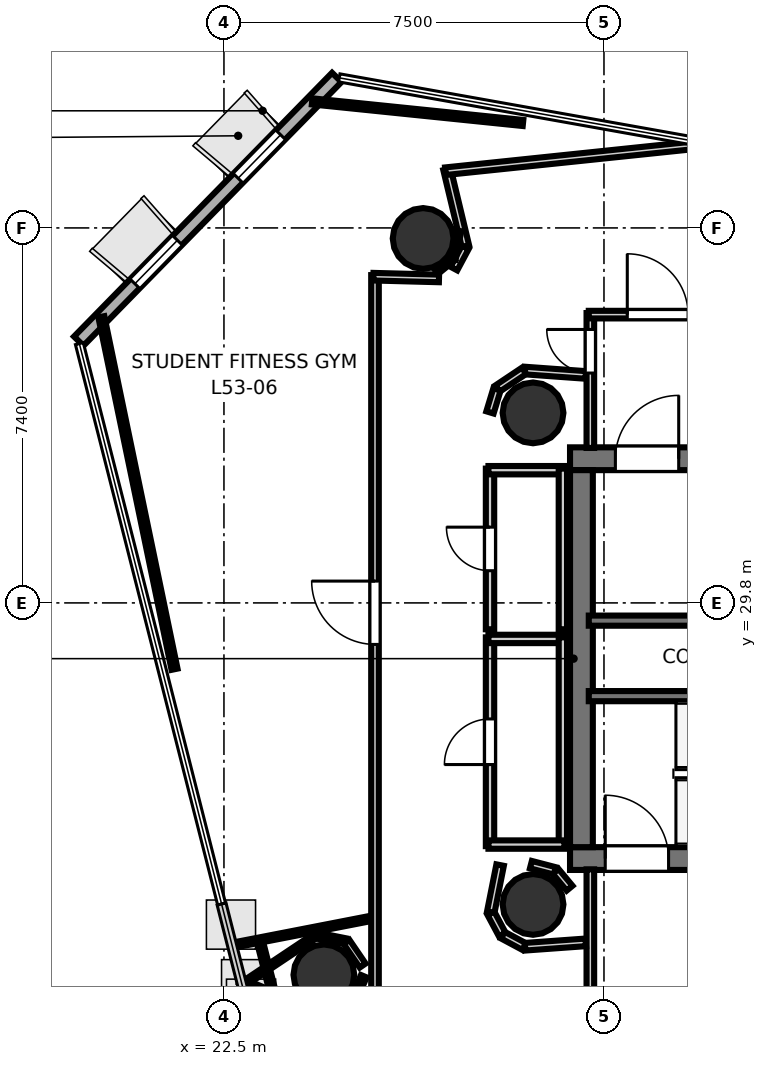
"""IFC4 building model, lengths in metres.
Left out: names, types, materials, properties, quantities, classifications, styles, units other than length and angle.
Written with IfcOpenShell. Run it as: python <this file> out.ifc"""

import sys

from ifc_helpers import new_model, si_unit, direction, frame, frame_2d, origin, origin_2d, place, context, subcontext, project, spatial, rectangle, hollow_circle, extrude, element, fill, save


model = new_model("IFC4")
c1 = context("Model", 3, precision=1e-05, world=origin(), true_north=direction((0.0, 1.0)))
c2 = subcontext(c1, "Body", "Model", "MODEL_VIEW")
j1 = project(units=[si_unit("LENGTHUNIT", "METRE"), si_unit("PLANEANGLEUNIT", "RADIAN")], contexts=[c1])
p1 = place(None, origin())
s1 = spatial("IfcSite", under=j1, at=p1, CompositionType="ELEMENT")
p2 = place(p1, origin())
s2 = spatial("IfcBuilding", under=s1, at=p2, CompositionType="ELEMENT")
p3 = place(p2, frame((0.0, 0.0, 207.7)))
s3 = spatial("IfcBuildingStorey", under=s2, at=p3, CompositionType="ELEMENT", Elevation=207.7)
p4 = place(p3, frame((29.33, 32.645, 0.0), z_axis=(0.0, 0.0, 1.0), x_axis=(1.0, 0.0, 0.0)))
e1 = element("IfcWall", 1, at=p4, inside=s3, PredefinedType="SHEAR", context=c2, shape_type="SweptSolid", body=[
    extrude(rectangle(XDim=10.52, YDim=0.45, at=frame_2d((5.26, 0.0))), origin(), (0.0, 0.0, 1.0), 3.52),
])
p5 = place(p4, frame((0.895, 0.0, 0.0)))
e2 = element("IfcOpeningElement", 2, at=p5, cuts=e1, PredefinedType="OPENING", context=c2, shape_type="SweptSolid", body=[
    extrude(rectangle(XDim=1.25, YDim=2.15, at=frame_2d((0.625, 1.075))), frame((0.0, 0.235, 0.0), z_axis=(0.0, -1.0, 0.0), x_axis=(1.0, 0.0, 0.0)), (0.0, 0.0, 1.0), 0.47),
])
p6 = place(p3, frame((29.33, 24.755, 0.0), z_axis=(0.0, 0.0, 1.0), x_axis=(1.0, 0.0, 0.0)))
e3 = element("IfcWall", 3, at=p6, inside=s3, PredefinedType="SHEAR", context=c2, shape_type="SweptSolid", body=[
    extrude(rectangle(XDim=10.52, YDim=0.45, at=frame_2d((5.26, 0.0))), origin(), (0.0, 0.0, 1.0), 3.52),
])
p7 = place(p6, frame((0.695, 0.0, 0.0)))
e4 = element("IfcOpeningElement", 4, at=p7, cuts=e3, PredefinedType="OPENING", context=c2, shape_type="SweptSolid", body=[
    extrude(rectangle(XDim=1.25, YDim=2.15, at=frame_2d((0.625, 1.075))), frame((0.0, 0.235, 0.0), z_axis=(0.0, -1.0, 0.0), x_axis=(1.0, 0.0, 0.0)), (0.0, 0.0, 1.0), 0.47),
])
p8 = place(p3, frame((29.555, 24.98, 0.0), z_axis=(0.0, 0.0, 1.0), x_axis=(0.0, 1.0, 0.0)))
e5 = element("IfcWall", 5, at=p8, inside=s3, PredefinedType="SHEAR", context=c2, shape_type="SweptSolid", body=[
    extrude(rectangle(XDim=7.44, YDim=0.45, at=frame_2d((3.72, 0.0))), origin(), (0.0, 0.0, 1.0), 3.52),
])
for number, where, z_axis, x_axis in (
    (6, (28.6, 33.55, 0.0), (0.0, 0.0, 1.0), (1.0, 0.0, 0.0)),
    (7, (28.6, 23.85, 0.0), (0.0, 0.0, 1.0), (1.0, 0.0, 0.0)),
    (8, (26.431, 36.992, 0.0), (0.0, 0.0, 1.0), (1.0, 0.0, 0.0)),
    (9, (24.472, 22.46, 0.0), (0.0, 0.0, 1.0), (1.0, 0.0, 0.0)),
):
    element("IfcColumn", number, at=place(p3, frame(where, z_axis=z_axis, x_axis=x_axis)), inside=s3, PredefinedType="COLUMN", context=c2, shape_type="SweptSolid", body=[
        extrude(hollow_circle(Radius=0.6, WallThickness=0.03, at=origin_2d()), origin(), (0.0, 0.0, 1.0), 3.7),
    ])
p9 = place(p3, frame((24.727, 40.17, 0.0), z_axis=(0.0, 0.0, 1.0), x_axis=(-0.699336240907, -0.714792852618, 0.0)))
e10 = element("IfcWall", 10, at=p9, inside=s3, PredefinedType="SOLIDWALL", context=c2, shape_type="SweptSolid", body=[
    extrude(rectangle(XDim=7.281, YDim=0.26, at=frame_2d((3.641, 0.0))), origin(), (0.0, 0.0, 1.0), 3.52),
])
p10 = place(p9, frame((1.584, 0.0, 0.9)))
e11 = element("IfcOpeningElement", 11, at=p10, cuts=e10, PredefinedType="OPENING", context=c2, shape_type="SweptSolid", body=[
    extrude(rectangle(XDim=1.2, YDim=2.0, at=frame_2d((0.6, 1.0))), frame((0.0, 0.14, 0.0), z_axis=(0.0, -1.0, 0.0), x_axis=(1.0, 0.0, 0.0)), (0.0, 0.0, 1.0), 0.28),
])
p11 = place(p9, frame((4.497, 0.0, 0.9)))
e12 = element("IfcOpeningElement", 12, at=p11, cuts=e10, PredefinedType="OPENING", context=c2, shape_type="SweptSolid", body=[
    extrude(rectangle(XDim=1.2, YDim=2.0, at=frame_2d((0.6, 1.0))), frame((0.0, 0.14, 0.0), z_axis=(0.0, -1.0, 0.0), x_axis=(1.0, 0.0, 0.0)), (0.0, 0.0, 1.0), 0.28),
])
p12 = place(p3, frame((29.7, 29.45, 0.0), z_axis=(0.0, 0.0, 1.0), x_axis=(1.0, 0.0, 0.0)))
e13 = element("IfcWall", 13, at=p12, inside=s3, PredefinedType="SOLIDWALL", context=c2, shape_type="SweptSolid", body=[
    extrude(rectangle(XDim=8.3, YDim=0.2, at=frame_2d((4.15, 0.0))), origin(), (0.0, 0.0, 1.0), 3.52),
])
p13 = place(p3, frame((29.7, 27.96, 0.0), z_axis=(0.0, 0.0, 1.0), x_axis=(1.0, 0.0, 0.0)))
e14 = element("IfcWall", 14, at=p13, inside=s3, PredefinedType="SOLIDWALL", context=c2, shape_type="SweptSolid", body=[
    extrude(rectangle(XDim=7.75, YDim=0.2, at=frame_2d((3.875, 0.0))), origin(), (0.0, 0.0, 1.0), 3.52),
])
p14 = place(p3, frame((29.731, 32.858, 0.0), z_axis=(0.0, 0.0, 1.0), x_axis=(0.0, 1.0, 0.0)))
e15 = element("IfcWall", 15, at=p14, inside=s3, PredefinedType="PARTITIONING", context=c2, shape_type="SweptSolid", body=[
    extrude(rectangle(XDim=2.662, YDim=0.15, at=frame_2d((1.331, 0.0))), origin(), (0.0, 0.0, 1.0), 2.84),
])
p15 = place(p14, frame((1.478, 0.0, 0.0)))
e16 = element("IfcOpeningElement", 16, at=p15, cuts=e15, PredefinedType="OPENING", context=c2, shape_type="SweptSolid", body=[
    extrude(rectangle(XDim=0.86, YDim=2.05, at=frame_2d((0.43, 1.025))), frame((0.0, 0.085, 0.0), z_axis=(0.0, -1.0, 0.0), x_axis=(1.0, 0.0, 0.0)), (0.0, 0.0, 1.0), 0.17),
])
p16 = place(p3, frame((29.7, 35.489, 0.0), z_axis=(0.0, 0.0, 1.0), x_axis=(1.0, 0.0, 0.0)))
e17 = element("IfcWall", 17, at=p16, inside=s3, PredefinedType="PARTITIONING", context=c2, shape_type="SweptSolid", body=[
    extrude(rectangle(XDim=2.72, YDim=0.15, at=frame_2d((1.36, 0.0))), origin(), (0.0, 0.0, 1.0), 2.84),
])
p17 = place(p16, frame((0.76, 0.0, 0.0)))
e18 = element("IfcOpeningElement", 18, at=p17, cuts=e17, PredefinedType="OPENING", context=c2, shape_type="SweptSolid", body=[
    extrude(rectangle(XDim=1.2, YDim=2.15, at=frame_2d((0.6, 1.075))), frame((0.0, 0.085, 0.0), z_axis=(0.0, -1.0, 0.0), x_axis=(1.0, 0.0, 0.0)), (0.0, 0.0, 1.0), 0.17),
])
p18 = place(p3, frame((29.731, 21.85, 0.0), z_axis=(0.0, 0.0, 1.0), x_axis=(0.0, 1.0, 0.0)))
e19 = element("IfcWall", 19, at=p18, inside=s3, PredefinedType="PARTITIONING", context=c2, shape_type="SweptSolid", body=[
    extrude(rectangle(XDim=2.692, YDim=0.15, at=frame_2d((1.346, 0.0))), origin(), (0.0, 0.0, 1.0), 2.84),
])
p19 = place(p3, frame((27.751, 25.0, 0.0), z_axis=(0.0, 0.0, 1.0), x_axis=(0.0, 1.0, 0.0)))
e20 = element("IfcWall", 20, at=p19, inside=s3, PredefinedType="PLUMBINGWALL", context=c2, shape_type="SweptSolid", body=[
    extrude(rectangle(XDim=4.12, YDim=0.165, at=frame_2d((2.06, 0.0))), origin(), (0.0, 0.0, 1.0), 2.84),
])
p20 = place(p19, frame((1.61, 0.0, 0.0)))
e21 = element("IfcOpeningElement", 21, at=p20, cuts=e20, PredefinedType="OPENING", context=c2, shape_type="SweptSolid", body=[
    extrude(rectangle(XDim=0.9, YDim=2.1, at=frame_2d((0.45, 1.05))), frame((0.0, 0.093, 0.0), z_axis=(0.0, -1.0, 0.0), x_axis=(1.0, 0.0, 0.0)), (0.0, 0.0, 1.0), 0.185),
])
p21 = place(p3, frame((27.72, 29.089, 0.0), z_axis=(0.0, 0.0, 1.0), x_axis=(1.0, 0.0, 0.0)))
e22 = element("IfcWall", 22, at=p21, inside=s3, PredefinedType="PLUMBINGWALL", context=c2, shape_type="SweptSolid", body=[
    extrude(rectangle(XDim=1.5, YDim=0.165, at=frame_2d((0.75, 0.0))), origin(), (0.0, 0.0, 1.0), 2.84),
])
p22 = place(p3, frame((29.189, 29.12, 0.0), z_axis=(0.0, 0.0, 1.0), x_axis=(0.0, -1.0, 0.0)))
e23 = element("IfcWall", 23, at=p22, inside=s3, PredefinedType="PLUMBINGWALL", context=c2, shape_type="SweptSolid", body=[
    extrude(rectangle(XDim=4.12, YDim=0.165, at=frame_2d((2.06, 0.0))), origin(), (0.0, 0.0, 1.0), 2.84),
])
p23 = place(p3, frame((29.22, 25.031, 0.0), z_axis=(0.0, 0.0, 1.0), x_axis=(-1.0, 0.0, 0.0)))
e24 = element("IfcWall", 24, at=p23, inside=s3, PredefinedType="PLUMBINGWALL", context=c2, shape_type="SweptSolid", body=[
    extrude(rectangle(XDim=1.5, YDim=0.165, at=frame_2d((0.75, 0.0))), origin(), (0.0, 0.0, 1.0), 2.84),
])
p24 = place(p3, frame((27.751, 29.28, 0.0), z_axis=(0.0, 0.0, 1.0), x_axis=(0.0, 1.0, 0.0)))
e25 = element("IfcWall", 25, at=p24, inside=s3, PredefinedType="PLUMBINGWALL", context=c2, shape_type="SweptSolid", body=[
    extrude(rectangle(XDim=3.17, YDim=0.165, at=frame_2d((1.585, 0.0))), origin(), (0.0, 0.0, 1.0), 2.84),
])
p25 = place(p24, frame((1.155, 0.0, 0.0)))
e26 = element("IfcOpeningElement", 26, at=p25, cuts=e25, PredefinedType="OPENING", context=c2, shape_type="SweptSolid", body=[
    extrude(rectangle(XDim=0.86, YDim=2.05, at=frame_2d((0.43, 1.025))), frame((0.0, 0.093, 0.0), z_axis=(0.0, -1.0, 0.0), x_axis=(1.0, 0.0, 0.0)), (0.0, 0.0, 1.0), 0.185),
])
p26 = place(p3, frame((27.72, 32.419, 0.0), z_axis=(0.0, 0.0, 1.0), x_axis=(1.0, 0.0, 0.0)))
e27 = element("IfcWall", 27, at=p26, inside=s3, PredefinedType="PLUMBINGWALL", context=c2, shape_type="SweptSolid", body=[
    extrude(rectangle(XDim=1.5, YDim=0.165, at=frame_2d((0.75, 0.0))), origin(), (0.0, 0.0, 1.0), 2.84),
])
p27 = place(p3, frame((29.189, 32.45, 0.0), z_axis=(0.0, 0.0, 1.0), x_axis=(0.0, -1.0, 0.0)))
e28 = element("IfcWall", 28, at=p27, inside=s3, PredefinedType="PLUMBINGWALL", context=c2, shape_type="SweptSolid", body=[
    extrude(rectangle(XDim=3.17, YDim=0.165, at=frame_2d((1.585, 0.0))), origin(), (0.0, 0.0, 1.0), 2.84),
])
p28 = place(p3, frame((29.321, 24.17, 0.0), z_axis=(0.0, 0.0, 1.0), x_axis=(-0.638008265708, 0.770029514296, 0.0)))
e29 = element("IfcWall", 29, at=p28, inside=s3, PredefinedType="PARTITIONING", context=c2, shape_type="SweptSolid", body=[
    extrude(rectangle(XDim=0.431, YDim=0.15, at=frame_2d((0.215, 0.0))), origin(), (0.0, 0.0, 1.0), 2.84),
])
p29 = place(p3, frame((29.03, 24.512, 0.0), z_axis=(0.0, 0.0, 1.0), x_axis=(-0.967681003213, 0.252177469296, 0.0)))
e30 = element("IfcWall", 30, at=p29, inside=s3, PredefinedType="PARTITIONING", context=c2, shape_type="SweptSolid", body=[
    extrude(rectangle(XDim=0.488, YDim=0.15, at=frame_2d((0.244, 0.0))), origin(), (0.0, 0.0, 1.0), 2.84),
])
p30 = place(p3, frame((27.265, 36.839, 0.0), z_axis=(0.0, 0.0, 1.0), x_axis=(-0.232734022169, 0.972540423286, 0.0)))
e31 = element("IfcWall", 31, at=p30, inside=s3, PredefinedType="PARTITIONING", context=c2, shape_type="SweptSolid", body=[
    extrude(rectangle(XDim=1.561, YDim=0.15, at=frame_2d((0.781, 0.0))), origin(), (0.0, 0.0, 1.0), 2.84),
])
p31 = place(p3, frame((26.872, 38.319, 0.0), z_axis=(0.0, 0.0, 1.0), x_axis=(0.994604354625, 0.103740916523, 0.0)))
e32 = element("IfcWall", 32, at=p31, inside=s3, PredefinedType="PARTITIONING", context=c2, shape_type="SweptSolid", body=[
    extrude(rectangle(XDim=5.224, YDim=0.15, at=frame_2d((2.612, 0.0))), origin(), (0.0, 0.0, 1.0), 2.84),
])
p32 = place(p3, frame((29.64, 34.299, 0.0), z_axis=(0.0, 0.0, 1.0), x_axis=(-0.997392224386, 0.072171675429, 0.0)))
e33 = element("IfcWall", 33, at=p32, inside=s3, PredefinedType="PARTITIONING", context=c2, shape_type="SweptSolid", body=[
    extrude(rectangle(XDim=1.201, YDim=0.15, at=frame_2d((0.601, 0.0))), origin(), (0.0, 0.0, 1.0), 2.84),
])
p33 = place(p3, frame((28.423, 34.38, 0.0), z_axis=(0.0, 0.0, 1.0), x_axis=(-0.831571279003, -0.555418047903, 0.0)))
e34 = element("IfcWall", 34, at=p33, inside=s3, PredefinedType="PARTITIONING", context=c2, shape_type="SweptSolid", body=[
    extrude(rectangle(XDim=0.628, YDim=0.15, at=frame_2d((0.314, 0.0))), origin(), (0.0, 0.0, 1.0), 2.84),
])
p34 = place(p3, frame((27.888, 34.015, 0.0), z_axis=(0.0, 0.0, 1.0), x_axis=(-0.290263585829, -0.956946733492, 0.0)))
e35 = element("IfcWall", 35, at=p34, inside=s3, PredefinedType="PARTITIONING", context=c2, shape_type="SweptSolid", body=[
    extrude(rectangle(XDim=0.476, YDim=0.15, at=frame_2d((0.238, 0.0))), origin(), (0.0, 0.0, 1.0), 2.84),
])
p35 = place(p3, frame((27.95, 24.626, 0.0), z_axis=(0.0, 0.0, 1.0), x_axis=(-0.195125950178, -0.980778192848, 0.0)))
e36 = element("IfcWall", 36, at=p35, inside=s3, PredefinedType="PARTITIONING", context=c2, shape_type="SweptSolid", body=[
    extrude(rectangle(XDim=0.948, YDim=0.15, at=frame_2d((0.474, 0.0))), origin(), (0.0, 0.0, 1.0), 2.84),
])
for number, where, z_axis, x_axis in (
    (37, (27.768, 23.675, 0.0), (0.0, 0.0, 1.0), (0.472, -0.882, 0.0)),
    (38, (28.006, 23.243, 0.0), (0.0, 0.0, 1.0), (0.882, -0.472, 0.0)),
):
    element("IfcWall", number, at=place(p3, frame(where, z_axis=z_axis, x_axis=x_axis)), inside=s3, PredefinedType="PARTITIONING", context=c2, shape_type="SweptSolid", body=[
        extrude(rectangle(XDim=0.476, YDim=0.15, at=frame_2d((0.238, 0.0))), origin(), (0.0, 0.0, 1.0), 2.84),
    ])
p36 = place(p3, frame((28.442, 23.015, 0.0), z_axis=(0.0, 0.0, 1.0), x_axis=(0.99740683837, 0.07196942943, 0.0)))
e39 = element("IfcWall", 39, at=p36, inside=s3, PredefinedType="PARTITIONING", context=c2, shape_type="SweptSolid", body=[
    extrude(rectangle(XDim=1.201, YDim=0.15, at=frame_2d((0.601, 0.0))), origin(), (0.0, 0.0, 1.0), 2.84),
])
p37 = place(p3, frame((25.481, 18.05, 0.0), z_axis=(0.0, 0.0, 1.0), x_axis=(0.0, 1.0, 0.0)))
e40 = element("IfcWall", 40, at=p37, inside=s3, PredefinedType="PARTITIONING", context=c2, shape_type="SweptSolid", body=[
    extrude(rectangle(XDim=18.219, YDim=0.15, at=frame_2d((9.109, 0.0))), origin(), (0.0, 0.0, 1.0), 2.84),
])
p38 = place(p37, frame((0.24, 0.0, 0.0)))
e41 = element("IfcOpeningElement", 41, at=p38, cuts=e40, PredefinedType="OPENING", context=c2, shape_type="SweptSolid", body=[
    extrude(rectangle(XDim=1.05, YDim=2.15, at=frame_2d((0.525, 1.075))), frame((0.0, 0.085, 0.0), z_axis=(0.0, -1.0, 0.0), x_axis=(1.0, 0.0, 0.0)), (0.0, 0.0, 1.0), 0.17),
])
p39 = place(p37, frame((10.93, 0.0, 0.0)))
e42 = element("IfcOpeningElement", 42, at=p39, cuts=e40, PredefinedType="OPENING", context=c2, shape_type="SweptSolid", body=[
    extrude(rectangle(XDim=1.25, YDim=2.2, at=frame_2d((0.625, 1.1))), frame((0.0, 0.085, 0.0), z_axis=(0.0, -1.0, 0.0), x_axis=(1.0, 0.0, 0.0)), (0.0, 0.0, 1.0), 0.17),
])
p40 = place(p3, frame((25.449, 36.238, 0.0), z_axis=(0.0, 0.0, 1.0), x_axis=(0.999651698073, -0.026390955635, 0.0)))
e43 = element("IfcWall", 43, at=p40, inside=s3, PredefinedType="PARTITIONING", context=c2, shape_type="SweptSolid", body=[
    extrude(rectangle(XDim=1.295, YDim=0.15, at=frame_2d((0.647, 0.0))), origin(), (0.0, 0.0, 1.0), 2.84),
])
p41 = place(p3, frame((27.038, 36.398, 0.0), z_axis=(0.0, 0.0, 1.0), x_axis=(0.471865548338, 0.881670519123, 0.0)))
e44 = element("IfcWall", 44, at=p41, inside=s3, PredefinedType="PARTITIONING", context=c2, shape_type="SweptSolid", body=[
    extrude(rectangle(XDim=0.476, YDim=0.15, at=frame_2d((0.238, 0.0))), origin(), (0.0, 0.0, 1.0), 2.84),
])
p42 = place(p3, frame((25.684, 13.366, 0.0), z_axis=(0.0, 0.0, 1.0), x_axis=(-0.245972953106, 0.969276692354, 0.0)))
e45 = element("IfcWall", 45, at=p42, inside=s3, PredefinedType="PARTITIONING", context=c2, shape_type="SweptSolid", body=[
    extrude(rectangle(XDim=10.123, YDim=0.12, at=frame_2d((5.062, 0.0))), origin(), (0.0, 0.0, 1.0), 2.84),
])
p43 = place(p3, frame((22.641, 23.037, 0.0), z_axis=(0.0, 0.0, 1.0), x_axis=(0.981621317476, 0.19083917071, 0.0)))
e46 = element("IfcWall", 46, at=p43, inside=s3, PredefinedType="PARTITIONING", context=c2, shape_type="SweptSolid", body=[
    extrude(rectangle(XDim=2.786, YDim=0.105, at=frame_2d((1.393, 0.0))), origin(), (0.0, 0.0, 1.0), 2.84),
])
p44 = place(p3, frame((25.238, 22.644, 0.0), z_axis=(0.0, 0.0, 1.0), x_axis=(-0.563363697458, 0.826209019792, 0.0)))
e47 = element("IfcWall", 47, at=p44, inside=s3, PredefinedType="PARTITIONING", context=c2, shape_type="SweptSolid", body=[
    extrude(rectangle(XDim=0.564, YDim=0.14, at=frame_2d((0.282, 0.0))), origin(), (0.0, 0.0, 1.0), 2.84),
])
p45 = place(p3, frame((24.9, 23.122, 0.0), z_axis=(0.0, 0.0, 1.0), x_axis=(-0.980773892286, 0.195147565217, 0.0)))
e48 = element("IfcWall", 48, at=p45, inside=s3, PredefinedType="PARTITIONING", context=c2, shape_type="SweptSolid", body=[
    extrude(rectangle(XDim=0.582, YDim=0.12, at=frame_2d((0.291, 0.0))), origin(), (0.0, 0.0, 1.0), 2.84),
])
p46 = place(p3, frame((24.306, 23.231, 0.0), z_axis=(0.0, 0.0, 1.0), x_axis=(-0.831388966537, -0.555690908978, 0.0)))
e49 = element("IfcWall", 49, at=p46, inside=s3, PredefinedType="PARTITIONING", context=c2, shape_type="SweptSolid", body=[
    extrude(rectangle(XDim=1.762, YDim=0.105, at=frame_2d((0.881, 0.0))), origin(), (0.0, 0.0, 1.0), 2.84),
])
p47 = place(p3, frame((22.819, 22.351, 0.0), z_axis=(0.0, 0.0, 1.0), x_axis=(0.923847632456, -0.382760436833, 0.0)))
e50 = element("IfcWall", 50, at=p47, inside=s3, PredefinedType="PARTITIONING", context=c2, shape_type="SweptSolid", body=[
    extrude(rectangle(XDim=1.776, YDim=0.105, at=frame_2d((0.888, 0.0))), origin(), (0.0, 0.0, 1.0), 2.84),
])
p48 = place(p3, frame((25.038, 21.91, 0.0), z_axis=(0.0, 0.0, 1.0), x_axis=(0.389093528864, 0.921198255424, 0.0)))
e51 = element("IfcWall", 51, at=p48, inside=s3, PredefinedType="PARTITIONING", context=c2, shape_type="SweptSolid", body=[
    extrude(rectangle(XDim=0.568, YDim=0.12, at=frame_2d((0.284, 0.0))), origin(), (0.0, 0.0, 1.0), 2.84),
])
p49 = place(p3, frame((24.24, 39.698, 0.0), z_axis=(0.0, 0.0, 1.0), x_axis=(0.994789788079, -0.10194742534, 0.0)))
e52 = element("IfcWall", 52, at=p49, inside=s3, PredefinedType="PARTITIONING", context=c2, shape_type="SweptSolid", body=[
    extrude(rectangle(XDim=4.184, YDim=0.12, at=frame_2d((2.092, 0.0))), origin(), (0.0, 0.0, 1.0), 2.84),
])
p50 = place(p3, frame((27.125, 37.146, 0.0), z_axis=(0.0, 0.0, 1.0), x_axis=(-0.195051328877, -0.980793035815, 0.0)))
e53 = element("IfcWall", 53, at=p50, inside=s3, PredefinedType="PARTITIONING", context=c2, shape_type="SweptSolid", body=[
    extrude(rectangle(XDim=0.573, YDim=0.12, at=frame_2d((0.287, 0.0))), origin(), (0.0, 0.0, 1.0), 2.84),
])
p51 = place(p3, frame((27.024, 36.602, 0.0), z_axis=(0.0, 0.0, 1.0), x_axis=(-0.775745027902, -0.631046473475, 0.0)))
e54 = element("IfcWall", 54, at=p51, inside=s3, PredefinedType="PARTITIONING", context=c2, shape_type="SweptSolid", body=[
    extrude(rectangle(XDim=0.425, YDim=0.105, at=frame_2d((0.213, 0.0))), origin(), (0.0, 0.0, 1.0), 2.84),
])
p52 = place(p3, frame((21.525, 28.491, 0.0), z_axis=(0.0, 0.0, 1.0), x_axis=(-0.20329541211, 0.979117447202, 0.0)))
e55 = element("IfcWall", 55, at=p52, inside=s3, PredefinedType="PARTITIONING", context=c2, shape_type="SweptSolid", body=[
    extrude(rectangle(XDim=7.104, YDim=0.12, at=frame_2d((3.552, 0.0))), origin(), (0.0, 0.0, 1.0), 2.84),
])
p53 = place(p5, origin())
e56 = element("IfcDoor", 56, at=p53, inside=s3, OperationType="SINGLE_SWING_RIGHT", PredefinedType="DOOR", context=c2, shape_type="SweptSolid", body=[
    extrude(rectangle(XDim=1.25, YDim=2.15, at=frame_2d((0.625, 1.075))), frame((0.0, 0.025, 0.0), z_axis=(0.0, -1.0, 0.0), x_axis=(1.0, 0.0, 0.0)), (0.0, 0.0, 1.0), 0.05),
])
fill(e2, e56)
p54 = place(p7, origin())
e57 = element("IfcDoor", 57, at=p54, inside=s3, OperationType="SINGLE_SWING_LEFT", PredefinedType="DOOR", context=c2, shape_type="SweptSolid", body=[
    extrude(rectangle(XDim=1.25, YDim=2.15, at=frame_2d((0.625, 1.075))), frame((0.0, 0.025, 0.0), z_axis=(0.0, -1.0, 0.0), x_axis=(1.0, 0.0, 0.0)), (0.0, 0.0, 1.0), 0.05),
])
fill(e4, e57)
p55 = place(p17, origin())
e58 = element("IfcDoor", 58, at=p55, inside=s3, OperationType="SINGLE_SWING_LEFT", PredefinedType="DOOR", context=c2, shape_type="SweptSolid", body=[
    extrude(rectangle(XDim=1.2, YDim=2.15, at=frame_2d((0.6, 1.075))), frame((0.0, 0.025, 0.0), z_axis=(0.0, -1.0, 0.0), x_axis=(1.0, 0.0, 0.0)), (0.0, 0.0, 1.0), 0.05),
])
fill(e18, e58)
p56 = place(p20, origin())
e59 = element("IfcDoor", 59, at=p56, inside=s3, OperationType="SINGLE_SWING_LEFT", PredefinedType="DOOR", context=c2, shape_type="SweptSolid", body=[
    extrude(rectangle(XDim=0.9, YDim=2.1, at=frame_2d((0.45, 1.05))), frame((0.0, 0.025, 0.0), z_axis=(0.0, -1.0, 0.0), x_axis=(1.0, 0.0, 0.0)), (0.0, 0.0, 1.0), 0.05),
])
fill(e21, e59)
p57 = place(p25, origin())
e60 = element("IfcDoor", 60, at=p57, inside=s3, OperationType="SINGLE_SWING_RIGHT", PredefinedType="DOOR", context=c2, shape_type="SweptSolid", body=[
    extrude(rectangle(XDim=0.86, YDim=2.05, at=frame_2d((0.43, 1.025))), frame((0.0, 0.025, 0.0), z_axis=(0.0, -1.0, 0.0), x_axis=(1.0, 0.0, 0.0)), (0.0, 0.0, 1.0), 0.05),
])
fill(e26, e60)
p58 = place(p15, origin())
e61 = element("IfcDoor", 61, at=p58, inside=s3, OperationType="SINGLE_SWING_RIGHT", PredefinedType="DOOR", context=c2, shape_type="SweptSolid", body=[
    extrude(rectangle(XDim=0.86, YDim=2.05, at=frame_2d((0.43, 1.025))), frame((0.0, 0.025, 0.0), z_axis=(0.0, -1.0, 0.0), x_axis=(1.0, 0.0, 0.0)), (0.0, 0.0, 1.0), 0.05),
])
fill(e16, e61)
p59 = place(p39, origin())
e62 = element("IfcDoor", 62, at=p59, inside=s3, OperationType="SINGLE_SWING_RIGHT", PredefinedType="DOOR", context=c2, shape_type="SweptSolid", body=[
    extrude(rectangle(XDim=1.25, YDim=2.2, at=frame_2d((0.625, 1.1))), frame((0.0, 0.025, 0.0), z_axis=(0.0, -1.0, 0.0), x_axis=(1.0, 0.0, 0.0)), (0.0, 0.0, 1.0), 0.05),
])
fill(e42, e62)
p60 = place(p10, origin())
e63 = element("IfcWindow", 63, at=p60, inside=s3, PartitioningType="SINGLE_PANEL", PredefinedType="WINDOW", context=c2, shape_type="SweptSolid", body=[
    extrude(rectangle(XDim=1.2, YDim=2.0, at=frame_2d((0.6, 1.0))), frame((0.0, 0.03, 0.0), z_axis=(0.0, -1.0, 0.0), x_axis=(1.0, 0.0, 0.0)), (0.0, 0.0, 1.0), 0.06),
])
fill(e11, e63)
p61 = place(p11, origin())
e64 = element("IfcWindow", 64, at=p61, inside=s3, PartitioningType="SINGLE_PANEL", PredefinedType="WINDOW", context=c2, shape_type="SweptSolid", body=[
    extrude(rectangle(XDim=1.2, YDim=2.0, at=frame_2d((0.6, 1.0))), frame((0.0, 0.03, 0.0), z_axis=(0.0, -1.0, 0.0), x_axis=(1.0, 0.0, 0.0)), (0.0, 0.0, 1.0), 0.06),
])
fill(e12, e64)
save(model, sys.argv[1])
